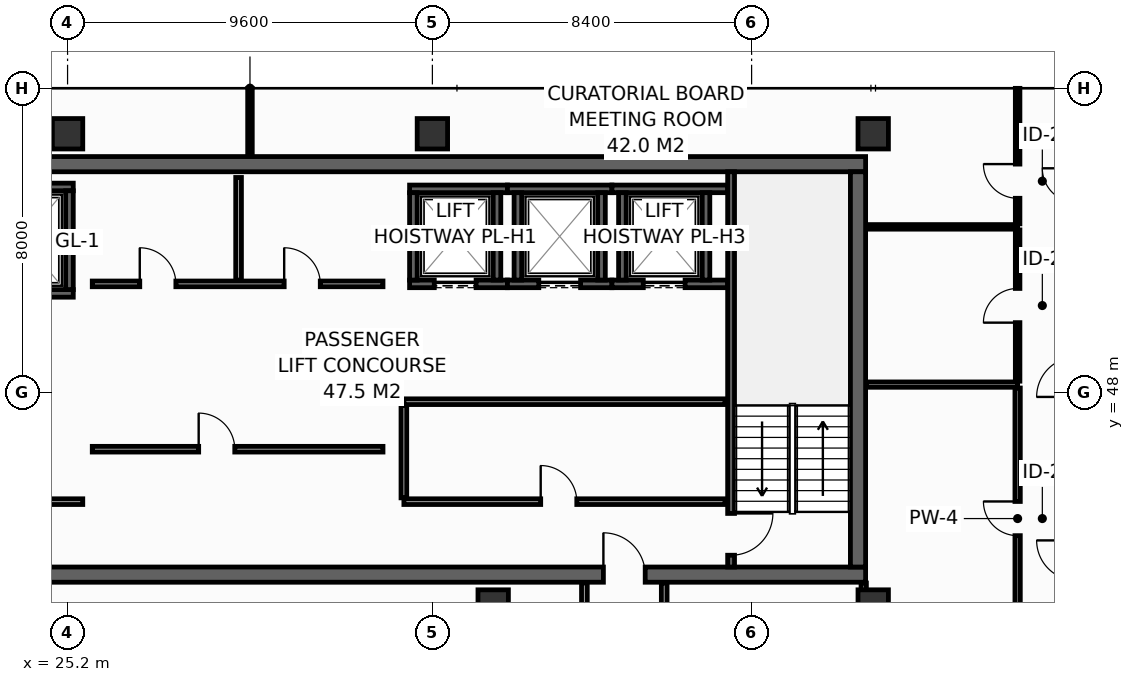
"""IFC4 building model, lengths in metres.
Left out: names, types, materials, properties, quantities, classifications, styles, units other than length and angle.
Written with IfcOpenShell. Run it as: python <this file> out.ifc"""

import sys

from ifc_helpers import new_model, si_unit, direction, frame, frame_2d, origin, origin_2d, place, context, subcontext, project, spatial, rectangle, hollow_rectangle, extrude, element, fill, save


model = new_model("IFC4")
c1 = context("Model", 3, precision=1e-05, world=origin(), true_north=direction((0.0, 1.0)))
c2 = subcontext(c1, "Body", "Model", "MODEL_VIEW")
j1 = project(units=[si_unit("LENGTHUNIT", "METRE"), si_unit("PLANEANGLEUNIT", "RADIAN")], contexts=[c1])
p1 = place(None, origin())
s1 = spatial("IfcSite", under=j1, at=p1, CompositionType="ELEMENT")
p2 = place(p1, origin())
s2 = spatial("IfcBuilding", under=s1, at=p2, CompositionType="ELEMENT")
p3 = place(p2, frame((0.0, 0.0, 242.0)))
s3 = spatial("IfcBuildingStorey", under=s2, at=p3, CompositionType="ELEMENT", Elevation=242.0)
p4 = place(p3, frame((13.7, 43.2, 0.0), z_axis=(0.0, 0.0, 1.0), x_axis=(1.0, 0.0, 0.0)))
e1 = element("IfcWall", 1, at=p4, inside=s3, PredefinedType="SHEAR", context=c2, shape_type="SweptSolid", body=[
    extrude(rectangle(XDim=32.5, YDim=0.4, at=frame_2d((16.25, 0.0))), origin(), (0.0, 0.0, 1.0), 3.55),
])
p5 = place(p4, frame((5.4, 0.0, 0.0)))
e2 = element("IfcOpeningElement", 2, at=p5, cuts=e1, PredefinedType="OPENING", context=c2, shape_type="SweptSolid", body=[
    extrude(rectangle(XDim=1.1, YDim=2.15, at=frame_2d((0.55, 1.075))), frame((0.0, 0.21, 0.0), z_axis=(0.0, -1.0, 0.0), x_axis=(1.0, 0.0, 0.0)), (0.0, 0.0, 1.0), 0.42),
])
p6 = place(p4, frame((25.6, 0.0, 0.0)))
e3 = element("IfcOpeningElement", 3, at=p6, cuts=e1, PredefinedType="OPENING", context=c2, shape_type="SweptSolid", body=[
    extrude(rectangle(XDim=1.1, YDim=2.15, at=frame_2d((0.55, 1.075))), frame((0.0, 0.21, 0.0), z_axis=(0.0, -1.0, 0.0), x_axis=(1.0, 0.0, 0.0)), (0.0, 0.0, 1.0), 0.42),
])
p7 = place(p3, frame((13.7, 54.0, 0.0), z_axis=(0.0, 0.0, 1.0), x_axis=(1.0, 0.0, 0.0)))
e4 = element("IfcWall", 4, at=p7, inside=s3, PredefinedType="SHEAR", context=c2, shape_type="SweptSolid", body=[
    extrude(rectangle(XDim=32.5, YDim=0.4, at=frame_2d((16.25, 0.0))), origin(), (0.0, 0.0, 1.0), 3.55),
])
p8 = place(p3, frame((46.0, 43.4, 0.0), z_axis=(0.0, 0.0, 1.0), x_axis=(0.0, 1.0, 0.0)))
e5 = element("IfcWall", 5, at=p8, inside=s3, PredefinedType="SHEAR", context=c2, shape_type="SweptSolid", body=[
    extrude(rectangle(XDim=10.4, YDim=0.4, at=frame_2d((5.2, 0.0))), origin(), (0.0, 0.0, 1.0), 3.55),
])
for number, where, z_axis, x_axis in (
    (6, (25.2, 54.8, 0.0), (0.0, 0.0, 1.0), (1.0, 0.0, 0.0)),
    (7, (34.8, 54.8, 0.0), (0.0, 0.0, 1.0), (1.0, 0.0, 0.0)),
    (8, (46.4, 54.8, 0.0), (0.0, 0.0, 1.0), (1.0, 0.0, 0.0)),
    (9, (36.4, 42.4, 0.0), (0.0, 0.0, 1.0), (1.0, 0.0, 0.0)),
    (10, (46.4, 42.4, 0.0), (0.0, 0.0, 1.0), (1.0, 0.0, 0.0)),
):
    element("IfcColumn", number, at=place(p3, frame(where, z_axis=z_axis, x_axis=x_axis)), inside=s3, PredefinedType="COLUMN", context=c2, shape_type="SweptSolid", body=[
        extrude(hollow_rectangle(XDim=0.8, YDim=0.8, WallThickness=0.036, at=origin_2d()), origin(), (0.0, 0.0, 1.0), 3.8),
    ])
p9 = place(p3, frame((22.5, 50.6, 0.0), z_axis=(0.0, 0.0, 1.0), x_axis=(1.0, 0.0, 0.0)))
e11 = element("IfcWall", 11, at=p9, inside=s3, PredefinedType="SHEAR", context=c2, shape_type="SweptSolid", body=[
    extrude(rectangle(XDim=2.85, YDim=0.2, at=frame_2d((1.425, 0.0))), origin(), (0.0, 0.0, 1.0), 3.55),
])
p10 = place(p9, frame((0.925, 0.0, 0.0)))
e12 = element("IfcOpeningElement", 12, at=p10, cuts=e11, PredefinedType="OPENING", context=c2, shape_type="SweptSolid", body=[
    extrude(rectangle(XDim=1.25, YDim=2.3, at=frame_2d((0.625, 1.15))), frame((0.0, 0.11, 0.0), z_axis=(0.0, -1.0, 0.0), x_axis=(1.0, 0.0, 0.0)), (0.0, 0.0, 1.0), 0.22),
])
p11 = place(p3, frame((22.5, 53.4, 0.0), z_axis=(0.0, 0.0, 1.0), x_axis=(1.0, 0.0, 0.0)))
e13 = element("IfcWall", 13, at=p11, inside=s3, PredefinedType="SHEAR", context=c2, shape_type="SweptSolid", body=[
    extrude(rectangle(XDim=2.85, YDim=0.2, at=frame_2d((1.425, 0.0))), origin(), (0.0, 0.0, 1.0), 3.55),
])
p12 = place(p3, frame((25.25, 50.7, 0.0), z_axis=(0.0, 0.0, 1.0), x_axis=(0.0, 1.0, 0.0)))
e14 = element("IfcWall", 14, at=p12, inside=s3, PredefinedType="SHEAR", context=c2, shape_type="SweptSolid", body=[
    extrude(rectangle(XDim=2.6, YDim=0.2, at=frame_2d((1.3, 0.0))), origin(), (0.0, 0.0, 1.0), 3.55),
])
p13 = place(p3, frame((34.2, 50.85, 0.0), z_axis=(0.0, 0.0, 1.0), x_axis=(1.0, 0.0, 0.0)))
e15 = element("IfcWall", 15, at=p13, inside=s3, PredefinedType="SHEAR", context=c2, shape_type="SweptSolid", body=[
    extrude(rectangle(XDim=2.575, YDim=0.2, at=frame_2d((1.288, 0.0))), origin(), (0.0, 0.0, 1.0), 3.55),
])
p14 = place(p13, frame((0.65, 0.0, 0.0)))
e16 = element("IfcOpeningElement", 16, at=p14, cuts=e15, PredefinedType="OPENING", context=c2, shape_type="SweptSolid", body=[
    extrude(rectangle(XDim=1.1, YDim=2.2, at=frame_2d((0.55, 1.1))), frame((0.0, 0.11, 0.0), z_axis=(0.0, -1.0, 0.0), x_axis=(1.0, 0.0, 0.0)), (0.0, 0.0, 1.0), 0.22),
])
p15 = place(p3, frame((34.2, 53.35, 0.0), z_axis=(0.0, 0.0, 1.0), x_axis=(1.0, 0.0, 0.0)))
e17 = element("IfcWall", 17, at=p15, inside=s3, PredefinedType="SHEAR", context=c2, shape_type="SweptSolid", body=[
    extrude(rectangle(XDim=2.575, YDim=0.2, at=frame_2d((1.288, 0.0))), origin(), (0.0, 0.0, 1.0), 3.55),
])
for number, where, z_axis, x_axis in (
    (18, (34.3, 50.95, 0.0), (0.0, 0.0, 1.0), (0.0, 1.0, 0.0)),
    (19, (36.5, 50.95, 0.0), (0.0, 0.0, 1.0), (0.0, 1.0, 0.0)),
):
    element("IfcWall", number, at=place(p3, frame(where, z_axis=z_axis, x_axis=x_axis)), inside=s3, PredefinedType="SHEAR", context=c2, shape_type="SweptSolid", body=[
        extrude(rectangle(XDim=2.3, YDim=0.2, at=frame_2d((1.15, 0.0))), origin(), (0.0, 0.0, 1.0), 3.55),
    ])
p16 = place(p3, frame((36.775, 50.85, 0.0), z_axis=(0.0, 0.0, 1.0), x_axis=(1.0, 0.0, 0.0)))
e20 = element("IfcWall", 20, at=p16, inside=s3, PredefinedType="SHEAR", context=c2, shape_type="SweptSolid", body=[
    extrude(rectangle(XDim=2.75, YDim=0.2, at=frame_2d((1.375, 0.0))), origin(), (0.0, 0.0, 1.0), 3.55),
])
p17 = place(p16, frame((0.825, 0.0, 0.0)))
e21 = element("IfcOpeningElement", 21, at=p17, cuts=e20, PredefinedType="OPENING", context=c2, shape_type="SweptSolid", body=[
    extrude(rectangle(XDim=1.1, YDim=2.2, at=frame_2d((0.55, 1.1))), frame((0.0, 0.11, 0.0), z_axis=(0.0, -1.0, 0.0), x_axis=(1.0, 0.0, 0.0)), (0.0, 0.0, 1.0), 0.22),
])
p18 = place(p3, frame((36.775, 53.35, 0.0), z_axis=(0.0, 0.0, 1.0), x_axis=(1.0, 0.0, 0.0)))
e22 = element("IfcWall", 22, at=p18, inside=s3, PredefinedType="SHEAR", context=c2, shape_type="SweptSolid", body=[
    extrude(rectangle(XDim=2.75, YDim=0.2, at=frame_2d((1.375, 0.0))), origin(), (0.0, 0.0, 1.0), 3.55),
])
for number, where, z_axis, x_axis in (
    (23, (37.05, 50.95, 0.0), (0.0, 0.0, 1.0), (0.0, 1.0, 0.0)),
    (24, (39.25, 50.95, 0.0), (0.0, 0.0, 1.0), (0.0, 1.0, 0.0)),
):
    element("IfcWall", number, at=place(p3, frame(where, z_axis=z_axis, x_axis=x_axis)), inside=s3, PredefinedType="SHEAR", context=c2, shape_type="SweptSolid", body=[
        extrude(rectangle(XDim=2.3, YDim=0.2, at=frame_2d((1.15, 0.0))), origin(), (0.0, 0.0, 1.0), 3.55),
    ])
p19 = place(p3, frame((39.525, 50.85, 0.0), z_axis=(0.0, 0.0, 1.0), x_axis=(1.0, 0.0, 0.0)))
e25 = element("IfcWall", 25, at=p19, inside=s3, PredefinedType="SHEAR", context=c2, shape_type="SweptSolid", body=[
    extrude(rectangle(XDim=3.045, YDim=0.2, at=frame_2d((1.522, 0.0))), origin(), (0.0, 0.0, 1.0), 3.55),
])
p20 = place(p19, frame((0.825, 0.0, 0.0)))
e26 = element("IfcOpeningElement", 26, at=p20, cuts=e25, PredefinedType="OPENING", context=c2, shape_type="SweptSolid", body=[
    extrude(rectangle(XDim=1.1, YDim=2.2, at=frame_2d((0.55, 1.1))), frame((0.0, 0.11, 0.0), z_axis=(0.0, -1.0, 0.0), x_axis=(1.0, 0.0, 0.0)), (0.0, 0.0, 1.0), 0.22),
])
p21 = place(p3, frame((39.525, 53.35, 0.0), z_axis=(0.0, 0.0, 1.0), x_axis=(1.0, 0.0, 0.0)))
e27 = element("IfcWall", 27, at=p21, inside=s3, PredefinedType="SHEAR", context=c2, shape_type="SweptSolid", body=[
    extrude(rectangle(XDim=3.045, YDim=0.2, at=frame_2d((1.522, 0.0))), origin(), (0.0, 0.0, 1.0), 3.55),
])
for number, where, z_axis, x_axis in (
    (28, (39.8, 50.95, 0.0), (0.0, 0.0, 1.0), (0.0, 1.0, 0.0)),
    (29, (42.0, 50.95, 0.0), (0.0, 0.0, 1.0), (0.0, 1.0, 0.0)),
):
    element("IfcWall", number, at=place(p3, frame(where, z_axis=z_axis, x_axis=x_axis)), inside=s3, PredefinedType="SHEAR", context=c2, shape_type="SweptSolid", body=[
        extrude(rectangle(XDim=2.3, YDim=0.2, at=frame_2d((1.15, 0.0))), origin(), (0.0, 0.0, 1.0), 3.55),
    ])
p22 = place(p3, frame((42.66, 53.8, 0.0), z_axis=(0.0, 0.0, 1.0), x_axis=(0.0, -1.0, 0.0)))
e30 = element("IfcWall", 30, at=p22, inside=s3, PredefinedType="SHEAR", context=c2, shape_type="SweptSolid", body=[
    extrude(rectangle(XDim=10.4, YDim=0.18, at=frame_2d((5.2, 0.0))), origin(), (0.0, 0.0, 1.0), 3.55),
])
p23 = place(p22, frame((8.99, 0.0, 0.0)))
e31 = element("IfcOpeningElement", 31, at=p23, cuts=e30, PredefinedType="OPENING", context=c2, shape_type="SweptSolid", body=[
    extrude(rectangle(XDim=1.1, YDim=2.15, at=frame_2d((0.55, 1.075))), frame((0.0, 0.1, 0.0), z_axis=(0.0, -1.0, 0.0), x_axis=(1.0, 0.0, 0.0)), (0.0, 0.0, 1.0), 0.2),
])
p24 = place(p3, frame((22.68, 45.12, 0.0), z_axis=(0.0, 0.0, 1.0), x_axis=(1.0, 0.0, 0.0)))
e32 = element("IfcWall", 32, at=p24, inside=s3, PredefinedType="PARTITIONING", context=c2, shape_type="SweptSolid", body=[
    extrude(rectangle(XDim=2.92, YDim=0.15, at=frame_2d((1.46, 0.0))), origin(), (0.0, 0.0, 1.0), 3.55),
])
p25 = place(p24, frame((0.85, 0.0, 0.0)))
e33 = element("IfcOpeningElement", 33, at=p25, cuts=e32, PredefinedType="OPENING", context=c2, shape_type="SweptSolid", body=[
    extrude(rectangle(XDim=1.1, YDim=2.15, at=frame_2d((0.55, 1.075))), frame((0.0, 0.085, 0.0), z_axis=(0.0, -1.0, 0.0), x_axis=(1.0, 0.0, 0.0)), (0.0, 0.0, 1.0), 0.17),
])
p26 = place(p3, frame((34.05, 45.12, 0.0), z_axis=(0.0, 0.0, 1.0), x_axis=(1.0, 0.0, 0.0)))
e34 = element("IfcWall", 34, at=p26, inside=s3, PredefinedType="PARTITIONING", context=c2, shape_type="SweptSolid", body=[
    extrude(rectangle(XDim=8.45, YDim=0.15, at=frame_2d((4.225, 0.0))), origin(), (0.0, 0.0, 1.0), 3.55),
])
p27 = place(p26, frame((3.6, 0.0, 0.0)))
e35 = element("IfcOpeningElement", 35, at=p27, cuts=e34, PredefinedType="OPENING", context=c2, shape_type="SweptSolid", body=[
    extrude(rectangle(XDim=0.95, YDim=2.15, at=frame_2d((0.475, 1.075))), frame((0.0, 0.085, 0.0), z_axis=(0.0, -1.0, 0.0), x_axis=(1.0, 0.0, 0.0)), (0.0, 0.0, 1.0), 0.17),
])
p28 = place(p3, frame((34.05, 47.75, 0.0), z_axis=(0.0, 0.0, 1.0), x_axis=(1.0, 0.0, 0.0)))
e36 = element("IfcWall", 36, at=p28, inside=s3, PredefinedType="PARTITIONING", context=c2, shape_type="SweptSolid", body=[
    extrude(rectangle(XDim=8.45, YDim=0.15, at=frame_2d((4.225, 0.0))), origin(), (0.0, 0.0, 1.0), 3.55),
])
p29 = place(p3, frame((34.05, 45.22, 0.0), z_axis=(0.0, 0.0, 1.0), x_axis=(0.0, 1.0, 0.0)))
e37 = element("IfcWall", 37, at=p29, inside=s3, PredefinedType="PARTITIONING", context=c2, shape_type="SweptSolid", body=[
    extrude(rectangle(XDim=2.43, YDim=0.15, at=frame_2d((1.215, 0.0))), origin(), (0.0, 0.0, 1.0), 3.55),
])
p30 = place(p3, frame((25.85, 50.85, 0.0), z_axis=(0.0, 0.0, 1.0), x_axis=(1.0, 0.0, 0.0)))
e38 = element("IfcWall", 38, at=p30, inside=s3, PredefinedType="PARTITIONING", context=c2, shape_type="SweptSolid", body=[
    extrude(rectangle(XDim=7.65, YDim=0.15, at=frame_2d((3.825, 0.0))), origin(), (0.0, 0.0, 1.0), 3.55),
])
p31 = place(p30, frame((1.25, 0.0, 0.0)))
e39 = element("IfcOpeningElement", 39, at=p31, cuts=e38, PredefinedType="OPENING", context=c2, shape_type="SweptSolid", body=[
    extrude(rectangle(XDim=0.95, YDim=2.15, at=frame_2d((0.475, 1.075))), frame((0.0, 0.085, 0.0), z_axis=(0.0, -1.0, 0.0), x_axis=(1.0, 0.0, 0.0)), (0.0, 0.0, 1.0), 0.17),
])
p32 = place(p30, frame((5.05, 0.0, 0.0)))
e40 = element("IfcOpeningElement", 40, at=p32, cuts=e38, PredefinedType="OPENING", context=c2, shape_type="SweptSolid", body=[
    extrude(rectangle(XDim=0.95, YDim=2.15, at=frame_2d((0.475, 1.075))), frame((0.0, 0.085, 0.0), z_axis=(0.0, -1.0, 0.0), x_axis=(1.0, 0.0, 0.0)), (0.0, 0.0, 1.0), 0.17),
])
p33 = place(p3, frame((29.7, 50.95, 0.0), z_axis=(0.0, 0.0, 1.0), x_axis=(0.0, 1.0, 0.0)))
e41 = element("IfcWall", 41, at=p33, inside=s3, PredefinedType="PARTITIONING", context=c2, shape_type="SweptSolid", body=[
    extrude(rectangle(XDim=2.7, YDim=0.15, at=frame_2d((1.35, 0.0))), origin(), (0.0, 0.0, 1.0), 3.55),
])
p34 = place(p3, frame((25.85, 46.5, 0.0), z_axis=(0.0, 0.0, 1.0), x_axis=(1.0, 0.0, 0.0)))
e42 = element("IfcWall", 42, at=p34, inside=s3, PredefinedType="PARTITIONING", context=c2, shape_type="SweptSolid", body=[
    extrude(rectangle(XDim=7.65, YDim=0.15, at=frame_2d((3.825, 0.0))), origin(), (0.0, 0.0, 1.0), 3.55),
])
p35 = place(p34, frame((2.8, 0.0, 0.0)))
e43 = element("IfcOpeningElement", 43, at=p35, cuts=e42, PredefinedType="OPENING", context=c2, shape_type="SweptSolid", body=[
    extrude(rectangle(XDim=0.95, YDim=2.15, at=frame_2d((0.475, 1.075))), frame((0.0, 0.085, 0.0), z_axis=(0.0, -1.0, 0.0), x_axis=(1.0, 0.0, 0.0)), (0.0, 0.0, 1.0), 0.17),
])
p36 = place(p3, frame((46.15, 41.24, 0.0), z_axis=(0.0, 0.0, 1.0), x_axis=(0.0, 1.0, 0.0)))
e44 = element("IfcWall", 44, at=p36, inside=s3, PredefinedType="PARTITIONING", context=c2, shape_type="SweptSolid", body=[
    extrude(rectangle(XDim=1.74, YDim=0.14, at=frame_2d((0.87, 0.0))), origin(), (0.0, 0.0, 1.0), 3.55),
])
p37 = place(p3, frame((46.22, 48.2, 0.0), z_axis=(0.0, 0.0, 1.0), x_axis=(1.0, 0.0, 0.0)))
e45 = element("IfcWall", 45, at=p37, inside=s3, PredefinedType="PARTITIONING", context=c2, shape_type="SweptSolid", body=[
    extrude(rectangle(XDim=3.98, YDim=0.14, at=frame_2d((1.99, 0.0))), origin(), (0.0, 0.0, 1.0), 3.55),
])
p38 = place(p3, frame((50.2, 41.24, 0.0), z_axis=(0.0, 0.0, 1.0), x_axis=(0.0, 1.0, 0.0)))
e46 = element("IfcWall", 46, at=p38, inside=s3, PredefinedType="PARTITIONING", context=c2, shape_type="SweptSolid", body=[
    extrude(rectangle(XDim=6.87, YDim=0.14, at=frame_2d((3.435, 0.0))), origin(), (0.0, 0.0, 1.0), 2.947),
])
p39 = place(p38, frame((2.985, 0.0, 0.0)))
e47 = element("IfcOpeningElement", 47, at=p39, cuts=e46, PredefinedType="OPENING", context=c2, shape_type="SweptSolid", body=[
    extrude(rectangle(XDim=0.9, YDim=2.1, at=frame_2d((0.45, 1.05))), frame((0.0, 0.08, 0.0), z_axis=(0.0, -1.0, 0.0), x_axis=(1.0, 0.0, 0.0)), (0.0, 0.0, 1.0), 0.16),
])
p40 = place(p3, frame((46.22, 52.35, 0.0), z_axis=(0.0, 0.0, 1.0), x_axis=(1.0, 0.0, 0.0)))
e48 = element("IfcWall", 48, at=p40, inside=s3, PredefinedType="PARTITIONING", context=c2, shape_type="SweptSolid", body=[
    extrude(rectangle(XDim=3.98, YDim=0.12, at=frame_2d((1.99, 0.0))), origin(), (0.0, 0.0, 1.0), 3.55),
])
p41 = place(p3, frame((30.0, 54.22, 0.0), z_axis=(0.0, 0.0, 1.0), x_axis=(0.0, 1.0, 0.0)))
e49 = element("IfcWall", 49, at=p41, inside=s3, PredefinedType="PARTITIONING", context=c2, shape_type="SweptSolid", body=[
    extrude(rectangle(XDim=1.775, YDim=0.12, at=frame_2d((0.888, 0.0))), origin(), (0.0, 0.0, 1.0), 2.935),
])
p42 = place(p3, frame((50.2, 48.29, 0.0), z_axis=(0.0, 0.0, 1.0), x_axis=(0.0, 1.0, 0.0)))
e50 = element("IfcWall", 50, at=p42, inside=s3, PredefinedType="PARTITIONING", context=c2, shape_type="SweptSolid", body=[
    extrude(rectangle(XDim=3.98, YDim=0.12, at=frame_2d((1.99, 0.0))), origin(), (0.0, 0.0, 1.0), 3.55),
])
p43 = place(p42, frame((1.54, 0.0, 0.0)))
e51 = element("IfcOpeningElement", 51, at=p43, cuts=e50, PredefinedType="OPENING", context=c2, shape_type="SweptSolid", body=[
    extrude(rectangle(XDim=0.9, YDim=2.1, at=frame_2d((0.45, 1.05))), frame((0.0, 0.07, 0.0), z_axis=(0.0, -1.0, 0.0), x_axis=(1.0, 0.0, 0.0)), (0.0, 0.0, 1.0), 0.14),
])
p44 = place(p3, frame((50.2, 52.43, 0.0), z_axis=(0.0, 0.0, 1.0), x_axis=(0.0, 1.0, 0.0)))
e52 = element("IfcWall", 52, at=p44, inside=s3, PredefinedType="PARTITIONING", context=c2, shape_type="SweptSolid", body=[
    extrude(rectangle(XDim=3.565, YDim=0.12, at=frame_2d((1.783, 0.0))), origin(), (0.0, 0.0, 1.0), 2.935),
])
p45 = place(p44, frame((0.672, 0.0, 0.0)))
e53 = element("IfcOpeningElement", 53, at=p45, cuts=e52, PredefinedType="OPENING", context=c2, shape_type="SweptSolid", body=[
    extrude(rectangle(XDim=0.9, YDim=2.1, at=frame_2d((0.45, 1.05))), frame((0.0, 0.07, 0.0), z_axis=(0.0, -1.0, 0.0), x_axis=(1.0, 0.0, 0.0)), (0.0, 0.0, 1.0), 0.14),
])
for number, where, z_axis, x_axis in (
    (54, (38.8, 41.15, 0.0), (0.0, 0.0, 1.0), (0.0, 1.0, 0.0)),
    (55, (40.9, 41.15, 0.0), (0.0, 0.0, 1.0), (0.0, 1.0, 0.0)),
):
    element("IfcWall", number, at=place(p3, frame(where, z_axis=z_axis, x_axis=x_axis)), inside=s3, PredefinedType="PARTITIONING", context=c2, shape_type="SweptSolid", body=[
        extrude(rectangle(XDim=1.83, YDim=0.15, at=frame_2d((0.915, 0.0))), origin(), (0.0, 0.0, 1.0), 3.55),
    ])
p46 = place(p14, origin())
e56 = element("IfcDoor", 56, at=p46, inside=s3, OperationType="SLIDING_TO_LEFT", PredefinedType="DOOR", context=c2, shape_type="SweptSolid", body=[
    extrude(rectangle(XDim=1.1, YDim=2.2, at=frame_2d((0.55, 1.1))), frame((0.0, 0.025, 0.0), z_axis=(0.0, -1.0, 0.0), x_axis=(1.0, 0.0, 0.0)), (0.0, 0.0, 1.0), 0.05),
])
fill(e16, e56)
p47 = place(p17, origin())
e57 = element("IfcDoor", 57, at=p47, inside=s3, OperationType="SLIDING_TO_LEFT", PredefinedType="DOOR", context=c2, shape_type="SweptSolid", body=[
    extrude(rectangle(XDim=1.1, YDim=2.2, at=frame_2d((0.55, 1.1))), frame((0.0, 0.025, 0.0), z_axis=(0.0, -1.0, 0.0), x_axis=(1.0, 0.0, 0.0)), (0.0, 0.0, 1.0), 0.05),
])
fill(e21, e57)
p48 = place(p20, origin())
e58 = element("IfcDoor", 58, at=p48, inside=s3, OperationType="SLIDING_TO_LEFT", PredefinedType="DOOR", context=c2, shape_type="SweptSolid", body=[
    extrude(rectangle(XDim=1.1, YDim=2.2, at=frame_2d((0.55, 1.1))), frame((0.0, 0.025, 0.0), z_axis=(0.0, -1.0, 0.0), x_axis=(1.0, 0.0, 0.0)), (0.0, 0.0, 1.0), 0.05),
])
fill(e26, e58)
p49 = place(p23, origin())
e59 = element("IfcDoor", 59, at=p49, inside=s3, OperationType="SINGLE_SWING_LEFT", PredefinedType="DOOR", context=c2, shape_type="SweptSolid", body=[
    extrude(rectangle(XDim=1.1, YDim=2.15, at=frame_2d((0.55, 1.075))), frame((0.0, 0.025, 0.0), z_axis=(0.0, -1.0, 0.0), x_axis=(1.0, 0.0, 0.0)), (0.0, 0.0, 1.0), 0.05),
])
fill(e31, e59)
p50 = place(p6, origin())
e60 = element("IfcDoor", 60, at=p50, inside=s3, OperationType="SINGLE_SWING_LEFT", PredefinedType="DOOR", context=c2, shape_type="SweptSolid", body=[
    extrude(rectangle(XDim=1.1, YDim=2.15, at=frame_2d((0.55, 1.075))), frame((0.0, 0.025, 0.0), z_axis=(0.0, -1.0, 0.0), x_axis=(1.0, 0.0, 0.0)), (0.0, 0.0, 1.0), 0.05),
])
fill(e3, e60)
p51 = place(p27, origin())
e61 = element("IfcDoor", 61, at=p51, inside=s3, OperationType="SINGLE_SWING_LEFT", PredefinedType="DOOR", context=c2, shape_type="SweptSolid", body=[
    extrude(rectangle(XDim=0.95, YDim=2.15, at=frame_2d((0.475, 1.075))), frame((0.0, 0.025, 0.0), z_axis=(0.0, -1.0, 0.0), x_axis=(1.0, 0.0, 0.0)), (0.0, 0.0, 1.0), 0.05),
])
fill(e35, e61)
p52 = place(p31, origin())
e62 = element("IfcDoor", 62, at=p52, inside=s3, OperationType="SINGLE_SWING_LEFT", PredefinedType="DOOR", context=c2, shape_type="SweptSolid", body=[
    extrude(rectangle(XDim=0.95, YDim=2.15, at=frame_2d((0.475, 1.075))), frame((0.0, 0.025, 0.0), z_axis=(0.0, -1.0, 0.0), x_axis=(1.0, 0.0, 0.0)), (0.0, 0.0, 1.0), 0.05),
])
fill(e39, e62)
p53 = place(p32, origin())
e63 = element("IfcDoor", 63, at=p53, inside=s3, OperationType="SINGLE_SWING_LEFT", PredefinedType="DOOR", context=c2, shape_type="SweptSolid", body=[
    extrude(rectangle(XDim=0.95, YDim=2.15, at=frame_2d((0.475, 1.075))), frame((0.0, 0.025, 0.0), z_axis=(0.0, -1.0, 0.0), x_axis=(1.0, 0.0, 0.0)), (0.0, 0.0, 1.0), 0.05),
])
fill(e40, e63)
p54 = place(p35, origin())
e64 = element("IfcDoor", 64, at=p54, inside=s3, OperationType="SINGLE_SWING_LEFT", PredefinedType="DOOR", context=c2, shape_type="SweptSolid", body=[
    extrude(rectangle(XDim=0.95, YDim=2.15, at=frame_2d((0.475, 1.075))), frame((0.0, 0.025, 0.0), z_axis=(0.0, -1.0, 0.0), x_axis=(1.0, 0.0, 0.0)), (0.0, 0.0, 1.0), 0.05),
])
fill(e43, e64)
p55 = place(p39, origin())
e65 = element("IfcDoor", 65, at=p55, inside=s3, OperationType="SINGLE_SWING_RIGHT", PredefinedType="DOOR", context=c2, shape_type="SweptSolid", body=[
    extrude(rectangle(XDim=0.9, YDim=2.1, at=frame_2d((0.45, 1.05))), frame((0.0, 0.025, 0.0), z_axis=(0.0, -1.0, 0.0), x_axis=(1.0, 0.0, 0.0)), (0.0, 0.0, 1.0), 0.05),
])
fill(e47, e65)
p56 = place(p43, origin())
e66 = element("IfcDoor", 66, at=p56, inside=s3, OperationType="SINGLE_SWING_LEFT", PredefinedType="DOOR", context=c2, shape_type="SweptSolid", body=[
    extrude(rectangle(XDim=0.9, YDim=2.1, at=frame_2d((0.45, 1.05))), frame((0.0, 0.025, 0.0), z_axis=(0.0, -1.0, 0.0), x_axis=(1.0, 0.0, 0.0)), (0.0, 0.0, 1.0), 0.05),
])
fill(e51, e66)
p57 = place(p45, origin())
e67 = element("IfcDoor", 67, at=p57, inside=s3, OperationType="SINGLE_SWING_RIGHT", PredefinedType="DOOR", context=c2, shape_type="SweptSolid", body=[
    extrude(rectangle(XDim=0.9, YDim=2.1, at=frame_2d((0.45, 1.05))), frame((0.0, 0.025, 0.0), z_axis=(0.0, -1.0, 0.0), x_axis=(1.0, 0.0, 0.0)), (0.0, 0.0, 1.0), 0.05),
])
fill(e53, e67)
save(model, sys.argv[1])
